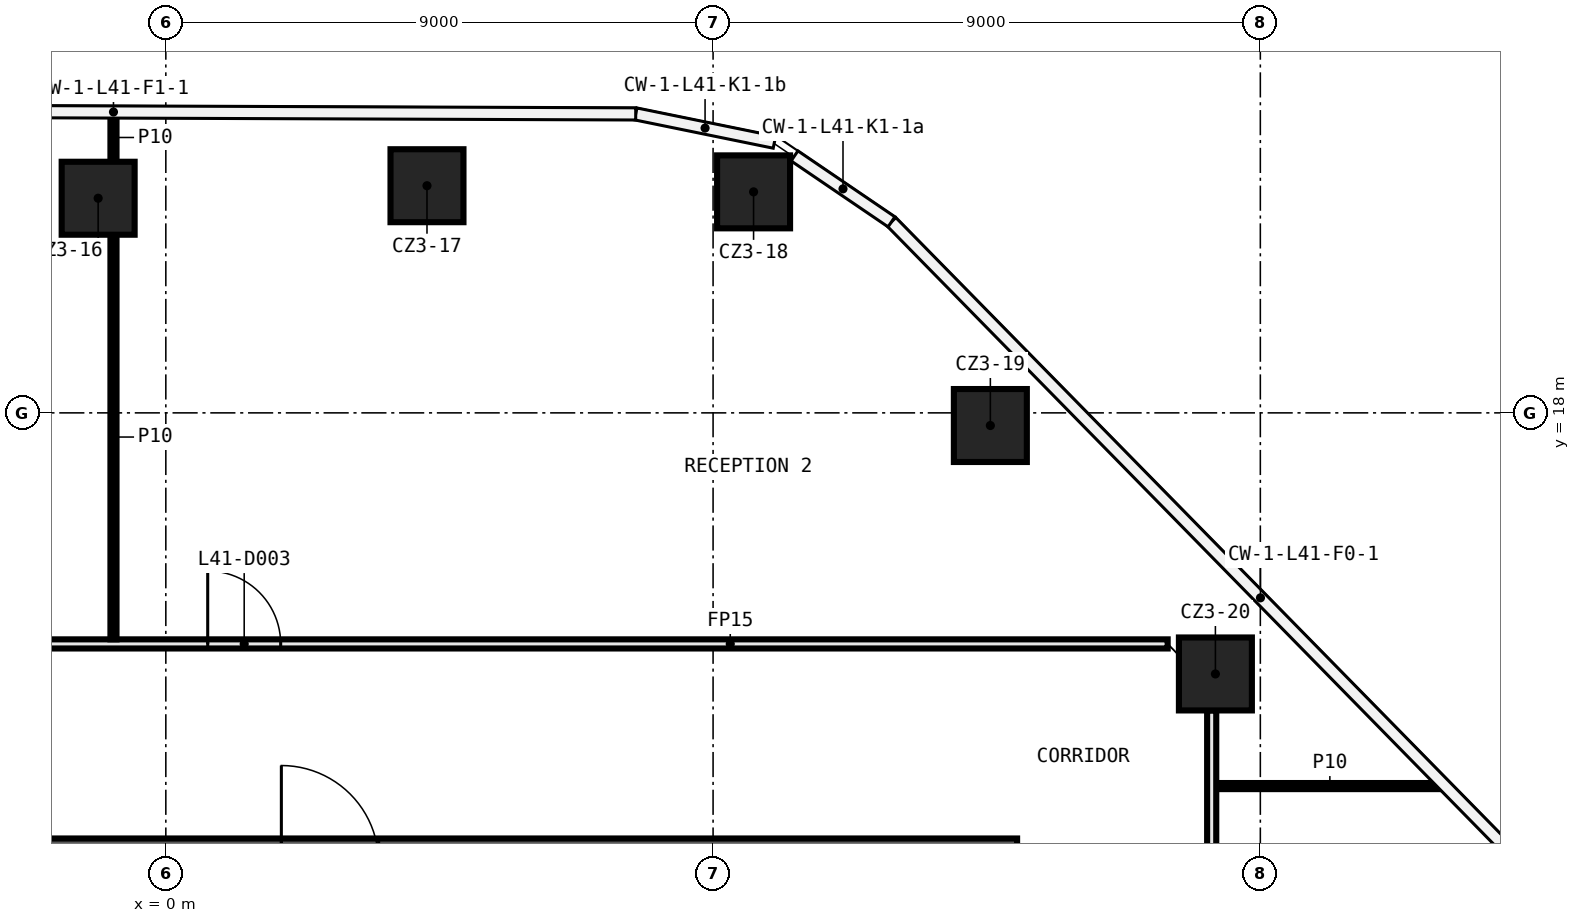
"""IFC4 building model, lengths in metres.
Left out: names, types, materials, properties, quantities, classifications, styles, units other than length and angle.
Written with IfcOpenShell. Run it as: python <this file> out.ifc"""

import sys

from ifc_helpers import new_model, si_unit, direction, frame, frame_2d, origin, origin_2d, place, context, subcontext, project, spatial, rectangle, extrude, element, fill, save


model = new_model("IFC4")
c1 = context("Model", 3, precision=1e-05, world=origin(), true_north=direction((0.0, 1.0)))
c2 = subcontext(c1, "Body", "Model", "MODEL_VIEW")
j1 = project(units=[si_unit("LENGTHUNIT", "METRE"), si_unit("PLANEANGLEUNIT", "RADIAN")], contexts=[c1])
p1 = place(None, origin())
s1 = spatial("IfcSite", under=j1, at=p1, CompositionType="ELEMENT")
p2 = place(p1, origin())
s2 = spatial("IfcBuilding", under=s1, at=p2, CompositionType="ELEMENT")
p3 = place(p2, frame((0.0, 0.0, 198.8)))
s3 = spatial("IfcBuildingStorey", under=s2, at=p3, CompositionType="ELEMENT", Elevation=198.8)
for number, where, z_axis, x_axis in (
    (1, (-1.113, 21.53, 0.0), (0.0, 0.0, 1.0), (1.0, 0.0, 0.0)),
    (2, (4.295, 21.736, 0.0), (0.0, 0.0, 1.0), (1.0, 0.0, 0.0)),
    (3, (9.666, 21.635, 0.0), (0.0, 0.0, 1.0), (1.0, 0.0, 0.0)),
    (4, (13.56, 17.792, 0.0), (0.0, 0.0, 1.0), (1.0, 0.0, 0.0)),
    (5, (17.261, 13.706, 0.0), (0.0, 0.0, 1.0), (1.0, 0.0, 0.0)),
):
    element("IfcColumn", number, at=place(p3, frame(where, z_axis=z_axis, x_axis=x_axis)), inside=s3, PredefinedType="COLUMN", context=c2, shape_type="SweptSolid", body=[
        extrude(rectangle(XDim=1.2, YDim=1.2, at=origin_2d()), origin(), (0.0, 0.0, 1.0), 3.82),
    ])
p4 = place(p3, frame((17.275, 11.862, 0.0), z_axis=(0.0, 0.0, 1.0), x_axis=(1.0, 0.0, 0.0)))
e6 = element("IfcWall", 6, at=p4, inside=s3, PredefinedType="PARTITIONING", context=c2, shape_type="SweptSolid", body=[
    extrude(rectangle(XDim=3.737, YDim=0.1, at=frame_2d((1.868, 0.0))), origin(), (0.0, 0.0, 1.0), 3.82),
])
p5 = place(p3, frame((-5.075, 14.2, 0.0), z_axis=(0.0, 0.0, 1.0), x_axis=(1.0, 0.0, 0.0)))
e7 = element("IfcWall", 7, at=p5, inside=s3, PredefinedType="PARTITIONING", context=c2, shape_type="SweptSolid", body=[
    extrude(rectangle(XDim=21.551, YDim=0.15, at=frame_2d((10.775, 0.0))), origin(), (0.0, 0.0, 1.0), 3.82),
])
p6 = place(p5, frame((5.764, 0.0, 0.0)))
e8 = element("IfcOpeningElement", 8, at=p6, cuts=e7, PredefinedType="OPENING", context=c2, shape_type="SweptSolid", body=[
    extrude(rectangle(XDim=1.2, YDim=2.1, at=frame_2d((0.6, 1.05))), frame((0.0, 0.085, 0.0), z_axis=(0.0, -1.0, 0.0), x_axis=(1.0, 0.0, 0.0)), (0.0, 0.0, 1.0), 0.17),
])
p7 = place(p5, frame((1.545, 0.0, 0.0)))
e9 = element("IfcOpeningElement", 9, at=p7, cuts=e7, PredefinedType="OPENING", context=c2, shape_type="SweptSolid", body=[
    extrude(rectangle(XDim=1.2, YDim=2.1, at=frame_2d((0.6, 1.05))), frame((0.0, 0.085, 0.0), z_axis=(0.0, -1.0, 0.0), x_axis=(1.0, 0.0, 0.0)), (0.0, 0.0, 1.0), 0.17),
])
p8 = place(p3, frame((17.2, 13.106, 0.0), z_axis=(0.0, 0.0, 1.0), x_axis=(0.0, -1.0, 0.0)))
e10 = element("IfcWall", 10, at=p8, inside=s3, PredefinedType="PARTITIONING", context=c2, shape_type="SweptSolid", body=[
    extrude(rectangle(XDim=23.172, YDim=0.15, at=frame_2d((11.586, 0.0))), origin(), (0.0, 0.0, 1.0), 3.82),
])
p9 = place(p8, frame((4.412, 0.0, 0.0)))
e11 = element("IfcOpeningElement", 11, at=p9, cuts=e10, PredefinedType="OPENING", context=c2, shape_type="SweptSolid", body=[
    extrude(rectangle(XDim=1.2, YDim=2.1, at=frame_2d((0.6, 1.05))), frame((0.0, 0.085, 0.0), z_axis=(0.0, -1.0, 0.0), x_axis=(1.0, 0.0, 0.0)), (0.0, 0.0, 1.0), 0.17),
])
p10 = place(p3, frame((-0.861, 14.275, 0.0), z_axis=(0.0, 0.0, 1.0), x_axis=(0.0, 1.0, 0.0)))
e12 = element("IfcWall", 12, at=p10, inside=s3, PredefinedType="PARTITIONING", context=c2, shape_type="SweptSolid", body=[
    extrude(rectangle(XDim=6.655, YDim=0.1, at=frame_2d((3.328, 0.0))), origin(), (0.0, 0.0, 1.0), 3.82),
])
p11 = place(p3, frame((-0.861, 22.13, 0.0), z_axis=(0.0, 0.0, 1.0), x_axis=(0.0, 1.0, 0.0)))
e13 = element("IfcWall", 13, at=p11, inside=s3, PredefinedType="PARTITIONING", context=c2, shape_type="SweptSolid", body=[
    extrude(rectangle(XDim=0.799, YDim=0.1, at=frame_2d((0.399, 0.0))), origin(), (0.0, 0.0, 1.0), 3.82),
])
p12 = place(p3, frame((-14.0, 10.6, 0.0), z_axis=(0.0, 0.0, 1.0), x_axis=(1.0, 0.0, 0.0)))
e14 = element("IfcWall", 14, at=p12, inside=s3, PredefinedType="SHEAR", context=c2, shape_type="SweptSolid", body=[
    extrude(rectangle(XDim=28.0, YDim=0.8, at=frame_2d((14.0, 0.0))), origin(), (0.0, 0.0, 1.0), 3.82),
])
p13 = place(p12, frame((15.9, 0.0, 0.0)))
e15 = element("IfcOpeningElement", 15, at=p13, cuts=e14, PredefinedType="OPENING", context=c2, shape_type="SweptSolid", body=[
    extrude(rectangle(XDim=1.6, YDim=2.1, at=frame_2d((0.8, 1.05))), frame((0.0, 0.41, 0.0), z_axis=(0.0, -1.0, 0.0), x_axis=(1.0, 0.0, 0.0)), (0.0, 0.0, 1.0), 0.82),
])
p14 = place(p6, origin())
e16 = element("IfcDoor", 16, at=p14, inside=s3, OperationType="SINGLE_SWING_RIGHT", PredefinedType="DOOR", context=c2, shape_type="SweptSolid", body=[
    extrude(rectangle(XDim=1.2, YDim=2.1, at=frame_2d((0.6, 1.05))), frame((0.0, 0.025, 0.0), z_axis=(0.0, -1.0, 0.0), x_axis=(1.0, 0.0, 0.0)), (0.0, 0.0, 1.0), 0.05),
])
fill(e8, e16)
save(model, sys.argv[1])
